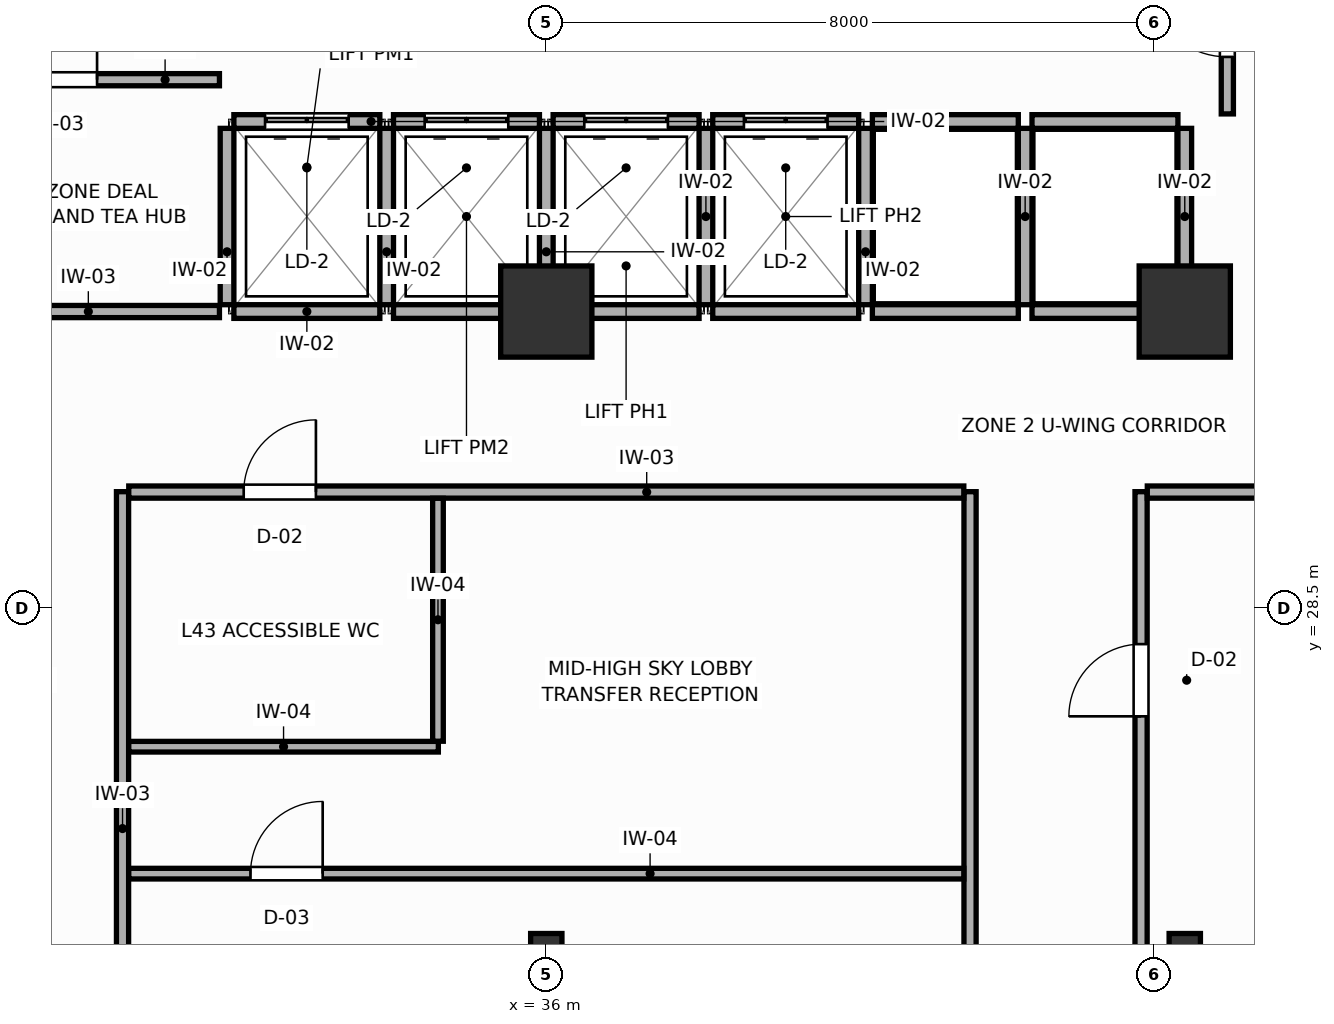
"""IFC4 building model, lengths in metres.
Left out: names, types, materials, properties, quantities, classifications, styles, units other than length and angle.
Written with IfcOpenShell. Run it as: python <this file> out.ifc"""

import sys

from ifc_helpers import new_model, si_unit, direction, frame, frame_2d, origin, origin_2d, place, context, subcontext, project, spatial, rectangle, i_section, extrude, source, transform, mapped, element, fill, save


model = new_model("IFC4")
c1 = context("Model", 3, precision=1e-05, world=origin(), true_north=direction((0.0, 1.0)))
c2 = subcontext(c1, "Body", "Model", "MODEL_VIEW")
j1 = project(units=[si_unit("LENGTHUNIT", "METRE"), si_unit("PLANEANGLEUNIT", "RADIAN")], contexts=[c1])
p1 = place(None, origin())
s1 = spatial("IfcSite", under=j1, at=p1, CompositionType="ELEMENT")
p2 = place(p1, origin())
s2 = spatial("IfcBuilding", under=s1, at=p2, CompositionType="ELEMENT")
p3 = place(p2, frame((0.0, 0.0, 168.6)))
s3 = spatial("IfcBuildingStorey", under=s2, at=p3, CompositionType="ELEMENT", Elevation=168.6)
m1 = source(origin(), c2, "Body", "SweptSolid", [
    extrude(rectangle(XDim=1.2, YDim=1.2, at=origin_2d()), origin(), (0.0, 0.0, 1.0), 3.6),
])
for number, where, z_axis, x_axis in (
    (1, (44.4, 32.4, 0.0), (0.0, 0.0, 1.0), (1.0, 0.0, 0.0)),
    (2, (36.0, 32.4, 0.0), (0.0, 0.0, 1.0), (1.0, 0.0, 0.0)),
):
    element("IfcColumn", number, at=place(p3, frame(where, z_axis=z_axis, x_axis=x_axis)), inside=s3, PredefinedType="COLUMN", context=c2, shape_type="MappedRepresentation", body=[
        mapped(m1, transform((0.0, 0.0, 0.0), scale=1.0)),
    ])
m2 = source(origin(), c2, "Body", "SweptSolid", [
    extrude(i_section(OverallWidth=0.412, OverallDepth=0.435, WebThickness=0.033, FlangeThickness=0.053, FilletRadius=0.015, at=origin_2d()), origin(), (0.0, 0.0, 1.0), 3.6),
])
for number, where, z_axis, x_axis in (
    (3, (44.4, 24.0, 0.0), (0.0, 0.0, 1.0), (1.0, 0.0, 0.0)),
    (4, (36.0, 24.0, 0.0), (0.0, 0.0, 1.0), (1.0, 0.0, 0.0)),
):
    element("IfcColumn", number, at=place(p3, frame(where, z_axis=z_axis, x_axis=x_axis)), inside=s3, PredefinedType="COLUMN", context=c2, shape_type="MappedRepresentation", body=[
        mapped(m2, transform((0.0, 0.0, 0.0), scale=1.0)),
    ])
p4 = place(p3, frame((31.89, 34.9, 0.0), z_axis=(0.0, 0.0, 1.0), x_axis=(1.0, 0.0, 0.0)))
e5 = element("IfcWall", 5, at=p4, inside=s3, PredefinedType="PARTITIONING", context=c2, shape_type="SweptSolid", body=[
    extrude(rectangle(XDim=1.92, YDim=0.18, at=frame_2d((0.96, 0.0))), origin(), (0.0, 0.0, 1.0), 3.4),
])
p5 = place(p4, frame((0.41, 0.0, 0.0)))
e6 = element("IfcOpeningElement", 6, at=p5, cuts=e5, PredefinedType="OPENING", context=c2, shape_type="SweptSolid", body=[
    extrude(rectangle(XDim=1.1, YDim=2.1, at=frame_2d((0.55, 1.05))), frame((0.0, 0.1, 0.0), z_axis=(0.0, -1.0, 0.0), x_axis=(1.0, 0.0, 0.0)), (0.0, 0.0, 1.0), 0.2),
])
p6 = place(p3, frame((31.89, 32.4, 0.0), z_axis=(0.0, 0.0, 1.0), x_axis=(1.0, 0.0, 0.0)))
e7 = element("IfcWall", 7, at=p6, inside=s3, PredefinedType="PARTITIONING", context=c2, shape_type="SweptSolid", body=[
    extrude(rectangle(XDim=1.92, YDim=0.18, at=frame_2d((0.96, 0.0))), origin(), (0.0, 0.0, 1.0), 2.95),
])
p7 = place(p3, frame((31.8, 32.49, 0.0), z_axis=(0.0, 0.0, 1.0), x_axis=(0.0, 1.0, 0.0)))
e8 = element("IfcWall", 8, at=p7, inside=s3, PredefinedType="PARTITIONING", context=c2, shape_type="SweptSolid", body=[
    extrude(rectangle(XDim=2.32, YDim=0.18, at=frame_2d((1.16, 0.0))), origin(), (0.0, 0.0, 1.0), 3.4),
])
p8 = place(p3, frame((33.99, 34.9, 0.0), z_axis=(0.0, 0.0, 1.0), x_axis=(1.0, 0.0, 0.0)))
e9 = element("IfcWall", 9, at=p8, inside=s3, PredefinedType="PARTITIONING", context=c2, shape_type="SweptSolid", body=[
    extrude(rectangle(XDim=1.92, YDim=0.18, at=frame_2d((0.96, 0.0))), origin(), (0.0, 0.0, 1.0), 3.4),
])
p9 = place(p8, frame((0.41, 0.0, 0.0)))
e10 = element("IfcOpeningElement", 10, at=p9, cuts=e9, PredefinedType="OPENING", context=c2, shape_type="SweptSolid", body=[
    extrude(rectangle(XDim=1.1, YDim=2.1, at=frame_2d((0.55, 1.05))), frame((0.0, 0.1, 0.0), z_axis=(0.0, -1.0, 0.0), x_axis=(1.0, 0.0, 0.0)), (0.0, 0.0, 1.0), 0.2),
])
p10 = place(p3, frame((33.99, 32.4, 0.0), z_axis=(0.0, 0.0, 1.0), x_axis=(1.0, 0.0, 0.0)))
e11 = element("IfcWall", 11, at=p10, inside=s3, PredefinedType="PARTITIONING", context=c2, shape_type="SweptSolid", body=[
    extrude(rectangle(XDim=1.92, YDim=0.18, at=frame_2d((0.96, 0.0))), origin(), (0.0, 0.0, 1.0), 2.95),
])
p11 = place(p3, frame((33.9, 32.49, 0.0), z_axis=(0.0, 0.0, 1.0), x_axis=(0.0, 1.0, 0.0)))
e12 = element("IfcWall", 12, at=p11, inside=s3, PredefinedType="PARTITIONING", context=c2, shape_type="SweptSolid", body=[
    extrude(rectangle(XDim=2.32, YDim=0.18, at=frame_2d((1.16, 0.0))), origin(), (0.0, 0.0, 1.0), 3.4),
])
p12 = place(p3, frame((36.09, 34.9, 0.0), z_axis=(0.0, 0.0, 1.0), x_axis=(1.0, 0.0, 0.0)))
e13 = element("IfcWall", 13, at=p12, inside=s3, PredefinedType="PARTITIONING", context=c2, shape_type="SweptSolid", body=[
    extrude(rectangle(XDim=1.92, YDim=0.18, at=frame_2d((0.96, 0.0))), origin(), (0.0, 0.0, 1.0), 3.4),
])
p13 = place(p12, frame((0.41, 0.0, 0.0)))
e14 = element("IfcOpeningElement", 14, at=p13, cuts=e13, PredefinedType="OPENING", context=c2, shape_type="SweptSolid", body=[
    extrude(rectangle(XDim=1.1, YDim=2.1, at=frame_2d((0.55, 1.05))), frame((0.0, 0.1, 0.0), z_axis=(0.0, -1.0, 0.0), x_axis=(1.0, 0.0, 0.0)), (0.0, 0.0, 1.0), 0.2),
])
p14 = place(p3, frame((36.09, 32.4, 0.0), z_axis=(0.0, 0.0, 1.0), x_axis=(1.0, 0.0, 0.0)))
e15 = element("IfcWall", 15, at=p14, inside=s3, PredefinedType="PARTITIONING", context=c2, shape_type="SweptSolid", body=[
    extrude(rectangle(XDim=1.92, YDim=0.18, at=frame_2d((0.96, 0.0))), origin(), (0.0, 0.0, 1.0), 2.95),
])
p15 = place(p3, frame((36.0, 32.49, 0.0), z_axis=(0.0, 0.0, 1.0), x_axis=(0.0, 1.0, 0.0)))
e16 = element("IfcWall", 16, at=p15, inside=s3, PredefinedType="PARTITIONING", context=c2, shape_type="SweptSolid", body=[
    extrude(rectangle(XDim=2.32, YDim=0.18, at=frame_2d((1.16, 0.0))), origin(), (0.0, 0.0, 1.0), 3.4),
])
p16 = place(p3, frame((38.19, 34.9, 0.0), z_axis=(0.0, 0.0, 1.0), x_axis=(1.0, 0.0, 0.0)))
e17 = element("IfcWall", 17, at=p16, inside=s3, PredefinedType="PARTITIONING", context=c2, shape_type="SweptSolid", body=[
    extrude(rectangle(XDim=1.92, YDim=0.18, at=frame_2d((0.96, 0.0))), origin(), (0.0, 0.0, 1.0), 3.4),
])
p17 = place(p16, frame((0.41, 0.0, 0.0)))
e18 = element("IfcOpeningElement", 18, at=p17, cuts=e17, PredefinedType="OPENING", context=c2, shape_type="SweptSolid", body=[
    extrude(rectangle(XDim=1.1, YDim=2.1, at=frame_2d((0.55, 1.05))), frame((0.0, 0.1, 0.0), z_axis=(0.0, -1.0, 0.0), x_axis=(1.0, 0.0, 0.0)), (0.0, 0.0, 1.0), 0.2),
])
p18 = place(p3, frame((38.19, 32.4, 0.0), z_axis=(0.0, 0.0, 1.0), x_axis=(1.0, 0.0, 0.0)))
e19 = element("IfcWall", 19, at=p18, inside=s3, PredefinedType="PARTITIONING", context=c2, shape_type="SweptSolid", body=[
    extrude(rectangle(XDim=1.92, YDim=0.18, at=frame_2d((0.96, 0.0))), origin(), (0.0, 0.0, 1.0), 2.95),
])
p19 = place(p3, frame((38.1, 32.49, 0.0), z_axis=(0.0, 0.0, 1.0), x_axis=(0.0, 1.0, 0.0)))
e20 = element("IfcWall", 20, at=p19, inside=s3, PredefinedType="PARTITIONING", context=c2, shape_type="SweptSolid", body=[
    extrude(rectangle(XDim=2.32, YDim=0.18, at=frame_2d((1.16, 0.0))), origin(), (0.0, 0.0, 1.0), 3.4),
])
p20 = place(p3, frame((40.29, 34.9, 0.0), z_axis=(0.0, 0.0, 1.0), x_axis=(1.0, 0.0, 0.0)))
e21 = element("IfcWall", 21, at=p20, inside=s3, PredefinedType="PARTITIONING", context=c2, shape_type="SweptSolid", body=[
    extrude(rectangle(XDim=1.92, YDim=0.18, at=frame_2d((0.96, 0.0))), origin(), (0.0, 0.0, 1.0), 3.4),
])
p21 = place(p3, frame((40.29, 32.4, 0.0), z_axis=(0.0, 0.0, 1.0), x_axis=(1.0, 0.0, 0.0)))
e22 = element("IfcWall", 22, at=p21, inside=s3, PredefinedType="PARTITIONING", context=c2, shape_type="SweptSolid", body=[
    extrude(rectangle(XDim=1.92, YDim=0.18, at=frame_2d((0.96, 0.0))), origin(), (0.0, 0.0, 1.0), 2.95),
])
p22 = place(p3, frame((40.2, 32.49, 0.0), z_axis=(0.0, 0.0, 1.0), x_axis=(0.0, 1.0, 0.0)))
e23 = element("IfcWall", 23, at=p22, inside=s3, PredefinedType="PARTITIONING", context=c2, shape_type="SweptSolid", body=[
    extrude(rectangle(XDim=2.32, YDim=0.18, at=frame_2d((1.16, 0.0))), origin(), (0.0, 0.0, 1.0), 3.4),
])
p23 = place(p3, frame((42.39, 34.9, 0.0), z_axis=(0.0, 0.0, 1.0), x_axis=(1.0, 0.0, 0.0)))
e24 = element("IfcWall", 24, at=p23, inside=s3, PredefinedType="PARTITIONING", context=c2, shape_type="SweptSolid", body=[
    extrude(rectangle(XDim=1.92, YDim=0.18, at=frame_2d((0.96, 0.0))), origin(), (0.0, 0.0, 1.0), 3.4),
])
p24 = place(p3, frame((42.39, 32.4, 0.0), z_axis=(0.0, 0.0, 1.0), x_axis=(1.0, 0.0, 0.0)))
e25 = element("IfcWall", 25, at=p24, inside=s3, PredefinedType="PARTITIONING", context=c2, shape_type="SweptSolid", body=[
    extrude(rectangle(XDim=1.92, YDim=0.18, at=frame_2d((0.96, 0.0))), origin(), (0.0, 0.0, 1.0), 2.95),
])
for number, where, z_axis, x_axis in (
    (26, (42.3, 32.49, 0.0), (0.0, 0.0, 1.0), (0.0, 1.0, 0.0)),
    (27, (44.4, 32.49, 0.0), (0.0, 0.0, 1.0), (0.0, 1.0, 0.0)),
):
    element("IfcWall", number, at=place(p3, frame(where, z_axis=z_axis, x_axis=x_axis)), inside=s3, PredefinedType="PARTITIONING", context=c2, shape_type="SweptSolid", body=[
        extrude(rectangle(XDim=2.32, YDim=0.18, at=frame_2d((1.16, 0.0))), origin(), (0.0, 0.0, 1.0), 3.4),
    ])
p25 = place(p3, frame((28.25, 32.4, 0.0), z_axis=(0.0, 0.0, 1.0), x_axis=(1.0, 0.0, 0.0)))
e28 = element("IfcWall", 28, at=p25, inside=s3, PredefinedType="PARTITIONING", context=c2, shape_type="SweptSolid", body=[
    extrude(rectangle(XDim=3.45, YDim=0.16, at=frame_2d((1.725, 0.0))), origin(), (0.0, 0.0, 1.0), 2.95),
])
p26 = place(p3, frame((27.69, 35.45, 0.0), z_axis=(0.0, 0.0, 1.0), x_axis=(1.0, 0.0, 0.0)))
e29 = element("IfcWall", 29, at=p26, inside=s3, PredefinedType="PARTITIONING", context=c2, shape_type="SweptSolid", body=[
    extrude(rectangle(XDim=4.01, YDim=0.16, at=frame_2d((2.005, 0.0))), origin(), (0.0, 0.0, 1.0), 3.4),
])
p27 = place(p26, frame((1.45, 0.0, 0.0)))
e30 = element("IfcOpeningElement", 30, at=p27, cuts=e29, PredefinedType="OPENING", context=c2, shape_type="SweptSolid", body=[
    extrude(rectangle(XDim=0.95, YDim=2.05, at=frame_2d((0.475, 1.025))), frame((0.0, 0.09, 0.0), z_axis=(0.0, -1.0, 0.0), x_axis=(1.0, 0.0, 0.0)), (0.0, 0.0, 1.0), 0.18),
])
p28 = place(p3, frame((44.96, 35.0, 0.0), z_axis=(0.0, 0.0, 1.0), x_axis=(0.0, 1.0, 0.0)))
e31 = element("IfcWall", 31, at=p28, inside=s3, PredefinedType="PARTITIONING", context=c2, shape_type="SweptSolid", body=[
    extrude(rectangle(XDim=2.65, YDim=0.16, at=frame_2d((1.325, 0.0))), origin(), (0.0, 0.0, 1.0), 3.4),
])
p29 = place(p28, frame((0.75, 0.0, 0.0)))
e32 = element("IfcOpeningElement", 32, at=p29, cuts=e31, PredefinedType="OPENING", context=c2, shape_type="SweptSolid", body=[
    extrude(rectangle(XDim=1.05, YDim=2.1, at=frame_2d((0.525, 1.05))), frame((0.0, 0.09, 0.0), z_axis=(0.0, -1.0, 0.0), x_axis=(1.0, 0.0, 0.0)), (0.0, 0.0, 1.0), 0.18),
])
p30 = place(p3, frame((30.425, 15.765, 0.0), z_axis=(0.0, 0.0, 1.0), x_axis=(0.0, 1.0, 0.0)))
e33 = element("IfcWall", 33, at=p30, inside=s3, PredefinedType="PARTITIONING", context=c2, shape_type="SweptSolid", body=[
    extrude(rectangle(XDim=14.265, YDim=0.16, at=frame_2d((7.132, 0.0))), origin(), (0.0, 0.0, 1.0), 3.4),
])
p31 = place(p30, frame((4.271, 0.0, 0.0)))
e34 = element("IfcOpeningElement", 34, at=p31, cuts=e33, PredefinedType="OPENING", context=c2, shape_type="SweptSolid", body=[
    extrude(rectangle(XDim=0.95, YDim=2.05, at=frame_2d((0.475, 1.025))), frame((0.0, 0.09, 0.0), z_axis=(0.0, -1.0, 0.0), x_axis=(1.0, 0.0, 0.0)), (0.0, 0.0, 1.0), 0.18),
])
p32 = place(p3, frame((41.575, 15.765, 0.0), z_axis=(0.0, 0.0, 1.0), x_axis=(0.0, 1.0, 0.0)))
e35 = element("IfcWall", 35, at=p32, inside=s3, PredefinedType="PARTITIONING", context=c2, shape_type="SweptSolid", body=[
    extrude(rectangle(XDim=14.265, YDim=0.16, at=frame_2d((7.132, 0.0))), origin(), (0.0, 0.0, 1.0), 3.4),
])
p33 = place(p3, frame((43.825, 18.538, 0.0), z_axis=(0.0, 0.0, 1.0), x_axis=(0.0, 1.0, 0.0)))
e36 = element("IfcWall", 36, at=p33, inside=s3, PredefinedType="PARTITIONING", context=c2, shape_type="SweptSolid", body=[
    extrude(rectangle(XDim=11.492, YDim=0.16, at=frame_2d((5.746, 0.0))), origin(), (0.0, 0.0, 1.0), 3.0),
])
p34 = place(p33, frame((8.537, 0.0, 0.0)))
e37 = element("IfcOpeningElement", 37, at=p34, cuts=e36, PredefinedType="OPENING", context=c2, shape_type="SweptSolid", body=[
    extrude(rectangle(XDim=0.95, YDim=2.05, at=frame_2d((0.475, 1.025))), frame((0.0, 0.09, 0.0), z_axis=(0.0, -1.0, 0.0), x_axis=(1.0, 0.0, 0.0)), (0.0, 0.0, 1.0), 0.18),
])
p35 = place(p3, frame((30.507, 30.025, 0.0), z_axis=(0.0, 0.0, 1.0), x_axis=(1.0, 0.0, 0.0)))
e38 = element("IfcWall", 38, at=p35, inside=s3, PredefinedType="PARTITIONING", context=c2, shape_type="SweptSolid", body=[
    extrude(rectangle(XDim=10.986, YDim=0.16, at=frame_2d((5.493, 0.0))), origin(), (0.0, 0.0, 1.0), 3.4),
])
p36 = place(p35, frame((1.512, 0.0, 0.0)))
e39 = element("IfcOpeningElement", 39, at=p36, cuts=e38, PredefinedType="OPENING", context=c2, shape_type="SweptSolid", body=[
    extrude(rectangle(XDim=0.95, YDim=2.05, at=frame_2d((0.475, 1.025))), frame((0.0, 0.09, 0.0), z_axis=(0.0, -1.0, 0.0), x_axis=(1.0, 0.0, 0.0)), (0.0, 0.0, 1.0), 0.18),
])
p37 = place(p3, frame((43.907, 30.025, 0.0), z_axis=(0.0, 0.0, 1.0), x_axis=(1.0, 0.0, 0.0)))
e40 = element("IfcWall", 40, at=p37, inside=s3, PredefinedType="PARTITIONING", context=c2, shape_type="SweptSolid", body=[
    extrude(rectangle(XDim=7.44, YDim=0.16, at=frame_2d((3.72, 0.0))), origin(), (0.0, 0.0, 1.0), 3.4),
])
p38 = place(p3, frame((30.507, 25.005, 0.0), z_axis=(0.0, 0.0, 1.0), x_axis=(1.0, 0.0, 0.0)))
e41 = element("IfcWall", 41, at=p38, inside=s3, PredefinedType="PARTITIONING", context=c2, shape_type="SweptSolid", body=[
    extrude(rectangle(XDim=10.986, YDim=0.14, at=frame_2d((5.493, 0.0))), origin(), (0.0, 0.0, 1.0), 3.4),
])
p39 = place(p38, frame((1.601, 0.0, 0.0)))
e42 = element("IfcOpeningElement", 42, at=p39, cuts=e41, PredefinedType="OPENING", context=c2, shape_type="SweptSolid", body=[
    extrude(rectangle(XDim=0.95, YDim=2.05, at=frame_2d((0.475, 1.025))), frame((0.0, 0.08, 0.0), z_axis=(0.0, -1.0, 0.0), x_axis=(1.0, 0.0, 0.0)), (0.0, 0.0, 1.0), 0.16),
])
p40 = place(p3, frame((30.507, 26.675, 0.0), z_axis=(0.0, 0.0, 1.0), x_axis=(1.0, 0.0, 0.0)))
e43 = element("IfcWall", 43, at=p40, inside=s3, PredefinedType="PARTITIONING", context=c2, shape_type="SweptSolid", body=[
    extrude(rectangle(XDim=4.073, YDim=0.14, at=frame_2d((2.037, 0.0))), origin(), (0.0, 0.0, 1.0), 3.4),
])
p41 = place(p3, frame((34.575, 26.747, 0.0), z_axis=(0.0, 0.0, 1.0), x_axis=(0.0, 1.0, 0.0)))
e44 = element("IfcWall", 44, at=p41, inside=s3, PredefinedType="PARTITIONING", context=c2, shape_type="SweptSolid", body=[
    extrude(rectangle(XDim=3.196, YDim=0.14, at=frame_2d((1.598, 0.0))), origin(), (0.0, 0.0, 1.0), 3.4),
])
p42 = place(p5, origin())
e45 = element("IfcDoor", 45, at=p42, inside=s3, OperationType="DOUBLE_DOOR_SLIDING", PredefinedType="DOOR", context=c2, shape_type="SweptSolid", body=[
    extrude(rectangle(XDim=1.1, YDim=2.1, at=frame_2d((0.55, 1.05))), frame((0.0, 0.025, 0.0), z_axis=(0.0, -1.0, 0.0), x_axis=(1.0, 0.0, 0.0)), (0.0, 0.0, 1.0), 0.05),
])
fill(e6, e45)
p43 = place(p9, origin())
e46 = element("IfcDoor", 46, at=p43, inside=s3, OperationType="DOUBLE_DOOR_SLIDING", PredefinedType="DOOR", context=c2, shape_type="SweptSolid", body=[
    extrude(rectangle(XDim=1.1, YDim=2.1, at=frame_2d((0.55, 1.05))), frame((0.0, 0.025, 0.0), z_axis=(0.0, -1.0, 0.0), x_axis=(1.0, 0.0, 0.0)), (0.0, 0.0, 1.0), 0.05),
])
fill(e10, e46)
p44 = place(p13, origin())
e47 = element("IfcDoor", 47, at=p44, inside=s3, OperationType="DOUBLE_DOOR_SLIDING", PredefinedType="DOOR", context=c2, shape_type="SweptSolid", body=[
    extrude(rectangle(XDim=1.1, YDim=2.1, at=frame_2d((0.55, 1.05))), frame((0.0, 0.025, 0.0), z_axis=(0.0, -1.0, 0.0), x_axis=(1.0, 0.0, 0.0)), (0.0, 0.0, 1.0), 0.05),
])
fill(e14, e47)
p45 = place(p17, origin())
e48 = element("IfcDoor", 48, at=p45, inside=s3, OperationType="DOUBLE_DOOR_SLIDING", PredefinedType="DOOR", context=c2, shape_type="SweptSolid", body=[
    extrude(rectangle(XDim=1.1, YDim=2.1, at=frame_2d((0.55, 1.05))), frame((0.0, 0.025, 0.0), z_axis=(0.0, -1.0, 0.0), x_axis=(1.0, 0.0, 0.0)), (0.0, 0.0, 1.0), 0.05),
])
fill(e18, e48)
p46 = place(p27, origin())
e49 = element("IfcDoor", 49, at=p46, inside=s3, OperationType="SINGLE_SWING_RIGHT", PredefinedType="DOOR", context=c2, shape_type="SweptSolid", body=[
    extrude(rectangle(XDim=0.95, YDim=2.05, at=frame_2d((0.475, 1.025))), frame((0.0, 0.025, 0.0), z_axis=(0.0, -1.0, 0.0), x_axis=(1.0, 0.0, 0.0)), (0.0, 0.0, 1.0), 0.05),
])
fill(e30, e49)
p47 = place(p29, origin())
e50 = element("IfcDoor", 50, at=p47, inside=s3, OperationType="SINGLE_SWING_RIGHT", PredefinedType="DOOR", context=c2, shape_type="SweptSolid", body=[
    extrude(rectangle(XDim=1.05, YDim=2.1, at=frame_2d((0.525, 1.05))), frame((0.0, 0.025, 0.0), z_axis=(0.0, -1.0, 0.0), x_axis=(1.0, 0.0, 0.0)), (0.0, 0.0, 1.0), 0.05),
])
fill(e32, e50)
p48 = place(p34, origin())
e51 = element("IfcDoor", 51, at=p48, inside=s3, OperationType="SINGLE_SWING_LEFT", PredefinedType="DOOR", context=c2, shape_type="SweptSolid", body=[
    extrude(rectangle(XDim=0.95, YDim=2.05, at=frame_2d((0.475, 1.025))), frame((0.0, 0.025, 0.0), z_axis=(0.0, -1.0, 0.0), x_axis=(1.0, 0.0, 0.0)), (0.0, 0.0, 1.0), 0.05),
])
fill(e37, e51)
p49 = place(p36, origin())
e52 = element("IfcDoor", 52, at=p49, inside=s3, OperationType="SINGLE_SWING_RIGHT", PredefinedType="DOOR", context=c2, shape_type="SweptSolid", body=[
    extrude(rectangle(XDim=0.95, YDim=2.05, at=frame_2d((0.475, 1.025))), frame((0.0, 0.025, 0.0), z_axis=(0.0, -1.0, 0.0), x_axis=(1.0, 0.0, 0.0)), (0.0, 0.0, 1.0), 0.05),
])
fill(e39, e52)
p50 = place(p39, origin())
e53 = element("IfcDoor", 53, at=p50, inside=s3, OperationType="SINGLE_SWING_RIGHT", PredefinedType="DOOR", context=c2, shape_type="SweptSolid", body=[
    extrude(rectangle(XDim=0.95, YDim=2.05, at=frame_2d((0.475, 1.025))), frame((0.0, 0.025, 0.0), z_axis=(0.0, -1.0, 0.0), x_axis=(1.0, 0.0, 0.0)), (0.0, 0.0, 1.0), 0.05),
])
fill(e42, e53)
save(model, sys.argv[1])
